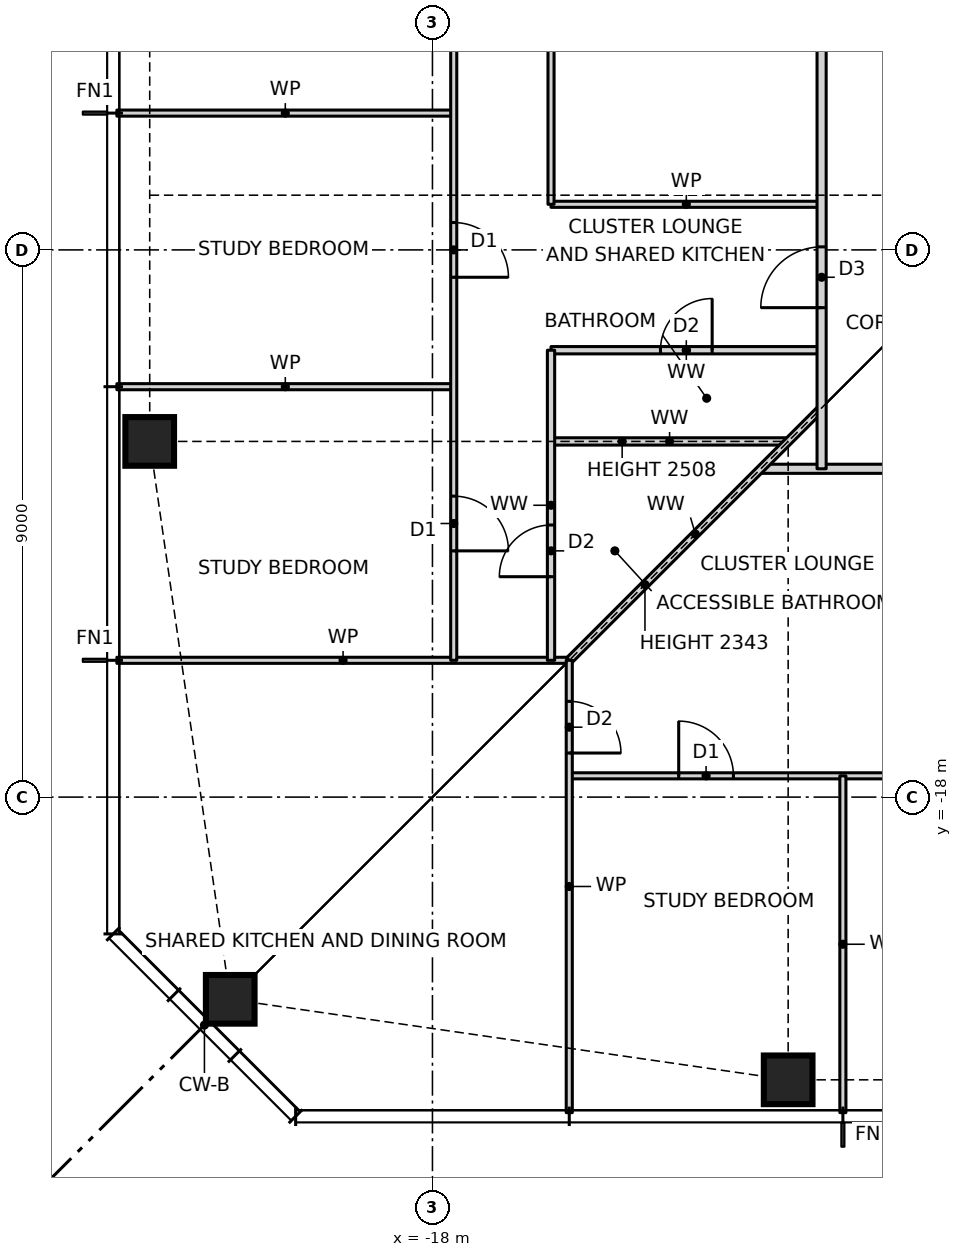
"""IFC4 building model, lengths in metres.
Left out: names, types, materials, properties, quantities, classifications, styles, units other than length and angle.
Written with IfcOpenShell. Run it as: python <this file> out.ifc"""

import sys

from ifc_helpers import new_model, si_unit, direction, frame, frame_2d, origin, origin_2d, place, context, subcontext, project, spatial, rectangle, hollow_rectangle, extrude, element, fill, save


model = new_model("IFC4")
c1 = context("Model", 3, precision=1e-05, world=origin(), true_north=direction((0.0, 1.0)))
c2 = subcontext(c1, "Body", "Model", "MODEL_VIEW")
j1 = project(units=[si_unit("LENGTHUNIT", "METRE"), si_unit("PLANEANGLEUNIT", "RADIAN")], contexts=[c1])
p1 = place(None, origin())
s1 = spatial("IfcSite", under=j1, at=p1, CompositionType="ELEMENT")
p2 = place(p1, origin())
s2 = spatial("IfcBuilding", under=s1, at=p2, CompositionType="ELEMENT")
p3 = place(p2, frame((0.0, 0.0, 22.0)))
s3 = spatial("IfcBuildingStorey", under=s2, at=p3, CompositionType="ELEMENT", Elevation=22.0)
for number, where, z_axis, x_axis in (
    (1, (-21.326, -21.326, 0.0), (0.0, 0.0, 1.0), (1.0, 0.0, 0.0)),
    (2, (-12.15, -22.65, 0.0), (0.0, 0.0, 1.0), (1.0, 0.0, 0.0)),
    (3, (-22.65, -12.15, 0.0), (0.0, 0.0, 1.0), (1.0, 0.0, 0.0)),
):
    element("IfcColumn", number, at=place(p3, frame(where, z_axis=z_axis, x_axis=x_axis)), inside=s3, PredefinedType="COLUMN", context=c2, shape_type="SweptSolid", body=[
        extrude(hollow_rectangle(XDim=0.8, YDim=0.8, WallThickness=0.09, at=origin_2d()), origin(), (0.0, 0.0, 1.0), 3.5),
    ])
p4 = place(p3, frame((-15.75, -17.65, 0.0), z_axis=(0.0, 0.0, 1.0), x_axis=(1.0, 0.0, 0.0)))
e4 = element("IfcWall", 4, at=p4, inside=s3, PredefinedType="PARTITIONING", context=c2, shape_type="SweptSolid", body=[
    extrude(rectangle(XDim=31.5, YDim=0.1, at=frame_2d((15.75, 0.0))), origin(), (0.0, 0.0, 1.0), 3.27),
])
p5 = place(p4, frame((1.8, 0.0, 0.0)))
e5 = element("IfcOpeningElement", 5, at=p5, cuts=e4, PredefinedType="OPENING", context=c2, shape_type="SweptSolid", body=[
    extrude(rectangle(XDim=0.9, YDim=2.1, at=frame_2d((0.45, 1.05))), frame((0.0, 0.06, 0.0), z_axis=(0.0, -1.0, 0.0), x_axis=(1.0, 0.0, 0.0)), (0.0, 0.0, 1.0), 0.12),
])
p6 = place(p4, frame((6.3, 0.0, 0.0)))
e6 = element("IfcOpeningElement", 6, at=p6, cuts=e4, PredefinedType="OPENING", context=c2, shape_type="SweptSolid", body=[
    extrude(rectangle(XDim=0.9, YDim=2.1, at=frame_2d((0.45, 1.05))), frame((0.0, 0.06, 0.0), z_axis=(0.0, -1.0, 0.0), x_axis=(1.0, 0.0, 0.0)), (0.0, 0.0, 1.0), 0.12),
])
p7 = place(p4, frame((10.8, 0.0, 0.0)))
e7 = element("IfcOpeningElement", 7, at=p7, cuts=e4, PredefinedType="OPENING", context=c2, shape_type="SweptSolid", body=[
    extrude(rectangle(XDim=0.9, YDim=2.1, at=frame_2d((0.45, 1.05))), frame((0.0, 0.06, 0.0), z_axis=(0.0, -1.0, 0.0), x_axis=(1.0, 0.0, 0.0)), (0.0, 0.0, 1.0), 0.12),
])
p8 = place(p4, frame((15.3, 0.0, 0.0)))
e8 = element("IfcOpeningElement", 8, at=p8, cuts=e4, PredefinedType="OPENING", context=c2, shape_type="SweptSolid", body=[
    extrude(rectangle(XDim=0.9, YDim=2.1, at=frame_2d((0.45, 1.05))), frame((0.0, 0.06, 0.0), z_axis=(0.0, -1.0, 0.0), x_axis=(1.0, 0.0, 0.0)), (0.0, 0.0, 1.0), 0.12),
])
p9 = place(p4, frame((19.8, 0.0, 0.0)))
e9 = element("IfcOpeningElement", 9, at=p9, cuts=e4, PredefinedType="OPENING", context=c2, shape_type="SweptSolid", body=[
    extrude(rectangle(XDim=0.9, YDim=2.1, at=frame_2d((0.45, 1.05))), frame((0.0, 0.06, 0.0), z_axis=(0.0, -1.0, 0.0), x_axis=(1.0, 0.0, 0.0)), (0.0, 0.0, 1.0), 0.12),
])
p10 = place(p4, frame((24.3, 0.0, 0.0)))
e10 = element("IfcOpeningElement", 10, at=p10, cuts=e4, PredefinedType="OPENING", context=c2, shape_type="SweptSolid", body=[
    extrude(rectangle(XDim=0.9, YDim=2.1, at=frame_2d((0.45, 1.05))), frame((0.0, 0.06, 0.0), z_axis=(0.0, -1.0, 0.0), x_axis=(1.0, 0.0, 0.0)), (0.0, 0.0, 1.0), 0.12),
])
p11 = place(p4, frame((28.8, 0.0, 0.0)))
e11 = element("IfcOpeningElement", 11, at=p11, cuts=e4, PredefinedType="OPENING", context=c2, shape_type="SweptSolid", body=[
    extrude(rectangle(XDim=0.9, YDim=2.1, at=frame_2d((0.45, 1.05))), frame((0.0, 0.06, 0.0), z_axis=(0.0, -1.0, 0.0), x_axis=(1.0, 0.0, 0.0)), (0.0, 0.0, 1.0), 0.12),
])
p12 = place(p3, frame((-23.19, -15.75, 0.0), z_axis=(0.0, 0.0, 1.0), x_axis=(1.0, 0.0, 0.0)))
e12 = element("IfcWall", 12, at=p12, inside=s3, PredefinedType="PARTITIONING", context=c2, shape_type="SweptSolid", body=[
    extrude(rectangle(XDim=7.44, YDim=0.1, at=frame_2d((3.72, 0.0))), origin(), (0.0, 0.0, 1.0), 3.27),
])
p13 = place(p3, frame((-12.6, -12.6, 0.0), z_axis=(0.0, 0.0, 1.0), x_axis=(1.0, 0.0, 0.0)))
e13 = element("IfcWall", 13, at=p13, inside=s3, PredefinedType="PARTITIONING", context=c2, shape_type="SweptSolid", body=[
    extrude(rectangle(XDim=25.2, YDim=0.15, at=frame_2d((12.6, 0.0))), origin(), (0.0, 0.0, 1.0), 3.27),
])
p14 = place(p13, frame((21.05, 0.0, 0.0)))
e14 = element("IfcOpeningElement", 14, at=p14, cuts=e13, PredefinedType="OPENING", context=c2, shape_type="SweptSolid", body=[
    extrude(rectangle(XDim=1.0, YDim=2.1, at=frame_2d((0.5, 1.05))), frame((0.0, 0.085, 0.0), z_axis=(0.0, -1.0, 0.0), x_axis=(1.0, 0.0, 0.0)), (0.0, 0.0, 1.0), 0.17),
])
p15 = place(p3, frame((-16.05, -12.15, 0.0), z_axis=(0.0, 0.0, 1.0), x_axis=(1.0, 0.0, 0.0)))
e15 = element("IfcWall", 15, at=p15, inside=s3, PredefinedType="PARTITIONING", context=c2, shape_type="SweptSolid", body=[
    extrude(rectangle(XDim=3.9, YDim=0.12, at=frame_2d((1.95, 0.0))), origin(), (0.0, 0.0, 1.0), 2.508),
])
p16 = place(p3, frame((-23.19, -11.25, 0.0), z_axis=(0.0, 0.0, 1.0), x_axis=(1.0, 0.0, 0.0)))
e16 = element("IfcWall", 16, at=p16, inside=s3, PredefinedType="PARTITIONING", context=c2, shape_type="SweptSolid", body=[
    extrude(rectangle(XDim=5.54, YDim=0.1, at=frame_2d((2.77, 0.0))), origin(), (0.0, 0.0, 1.0), 3.27),
])
p17 = place(p3, frame((-16.05, -10.65, 0.0), z_axis=(0.0, 0.0, 1.0), x_axis=(1.0, 0.0, 0.0)))
e17 = element("IfcWall", 17, at=p17, inside=s3, PredefinedType="PARTITIONING", context=c2, shape_type="SweptSolid", body=[
    extrude(rectangle(XDim=4.45, YDim=0.12, at=frame_2d((2.225, 0.0))), origin(), (0.0, 0.0, 1.0), 3.27),
])
p18 = place(p17, frame((1.8, 0.0, 0.0)))
e18 = element("IfcOpeningElement", 18, at=p18, cuts=e17, PredefinedType="OPENING", context=c2, shape_type="SweptSolid", body=[
    extrude(rectangle(XDim=0.85, YDim=2.1, at=frame_2d((0.425, 1.05))), frame((0.0, 0.07, 0.0), z_axis=(0.0, -1.0, 0.0), x_axis=(1.0, 0.0, 0.0)), (0.0, 0.0, 1.0), 0.14),
])
p19 = place(p3, frame((-16.05, -8.25, 0.0), z_axis=(0.0, 0.0, 1.0), x_axis=(1.0, 0.0, 0.0)))
e19 = element("IfcWall", 19, at=p19, inside=s3, PredefinedType="PARTITIONING", context=c2, shape_type="SweptSolid", body=[
    extrude(rectangle(XDim=4.45, YDim=0.1, at=frame_2d((2.225, 0.0))), origin(), (0.0, 0.0, 1.0), 3.27),
])
p20 = place(p3, frame((-23.19, -6.75, 0.0), z_axis=(0.0, 0.0, 1.0), x_axis=(1.0, 0.0, 0.0)))
e20 = element("IfcWall", 20, at=p20, inside=s3, PredefinedType="PARTITIONING", context=c2, shape_type="SweptSolid", body=[
    extrude(rectangle(XDim=5.54, YDim=0.1, at=frame_2d((2.77, 0.0))), origin(), (0.0, 0.0, 1.0), 3.27),
])
p21 = place(p3, frame((-15.75, -15.75, 0.0), z_axis=(0.0, 0.0, 1.0), x_axis=(0.707106781187, 0.707106781187, 0.0)))
e21 = element("IfcWall", 21, at=p21, inside=s3, PredefinedType="PARTITIONING", context=c2, shape_type="SweptSolid", body=[
    extrude(rectangle(XDim=5.869, YDim=0.12, at=frame_2d((2.935, 0.0))), origin(), (0.0, 0.0, 1.0), 2.343),
])
p22 = place(p3, frame((-11.25, -23.19, 0.0), z_axis=(0.0, 0.0, 1.0), x_axis=(0.0, 1.0, 0.0)))
e22 = element("IfcWall", 22, at=p22, inside=s3, PredefinedType="PARTITIONING", context=c2, shape_type="SweptSolid", body=[
    extrude(rectangle(XDim=5.54, YDim=0.1, at=frame_2d((2.77, 0.0))), origin(), (0.0, 0.0, 1.0), 3.27),
])
p23 = place(p3, frame((-11.6, -12.6, 0.0), z_axis=(0.0, 0.0, 1.0), x_axis=(0.0, 1.0, 0.0)))
e23 = element("IfcWall", 23, at=p23, inside=s3, PredefinedType="PARTITIONING", context=c2, shape_type="SweptSolid", body=[
    extrude(rectangle(XDim=24.2, YDim=0.15, at=frame_2d((12.1, 0.0))), origin(), (0.0, 0.0, 1.0), 3.27),
])
p24 = place(p23, frame((2.65, 0.0, 0.0)))
e24 = element("IfcOpeningElement", 24, at=p24, cuts=e23, PredefinedType="OPENING", context=c2, shape_type="SweptSolid", body=[
    extrude(rectangle(XDim=1.0, YDim=2.1, at=frame_2d((0.5, 1.05))), frame((0.0, 0.085, 0.0), z_axis=(0.0, -1.0, 0.0), x_axis=(1.0, 0.0, 0.0)), (0.0, 0.0, 1.0), 0.17),
])
p25 = place(p3, frame((-15.75, -23.19, 0.0), z_axis=(0.0, 0.0, 1.0), x_axis=(0.0, 1.0, 0.0)))
e25 = element("IfcWall", 25, at=p25, inside=s3, PredefinedType="PARTITIONING", context=c2, shape_type="SweptSolid", body=[
    extrude(rectangle(XDim=7.44, YDim=0.1, at=frame_2d((3.72, 0.0))), origin(), (0.0, 0.0, 1.0), 3.27),
])
p26 = place(p25, frame((5.915, 0.0, 0.0)))
e26 = element("IfcOpeningElement", 26, at=p26, cuts=e25, PredefinedType="OPENING", context=c2, shape_type="SweptSolid", body=[
    extrude(rectangle(XDim=0.85, YDim=2.1, at=frame_2d((0.425, 1.05))), frame((0.0, 0.06, 0.0), z_axis=(0.0, -1.0, 0.0), x_axis=(1.0, 0.0, 0.0)), (0.0, 0.0, 1.0), 0.12),
])
p27 = place(p3, frame((-16.05, -15.75, 0.0), z_axis=(0.0, 0.0, 1.0), x_axis=(0.0, 1.0, 0.0)))
e27 = element("IfcWall", 27, at=p27, inside=s3, PredefinedType="PARTITIONING", context=c2, shape_type="SweptSolid", body=[
    extrude(rectangle(XDim=5.1, YDim=0.12, at=frame_2d((2.55, 0.0))), origin(), (0.0, 0.0, 1.0), 3.27),
])
p28 = place(p27, frame((1.375, 0.0, 0.0)))
e28 = element("IfcOpeningElement", 28, at=p28, cuts=e27, PredefinedType="OPENING", context=c2, shape_type="SweptSolid", body=[
    extrude(rectangle(XDim=0.85, YDim=2.1, at=frame_2d((0.425, 1.05))), frame((0.0, 0.07, 0.0), z_axis=(0.0, -1.0, 0.0), x_axis=(1.0, 0.0, 0.0)), (0.0, 0.0, 1.0), 0.14),
])
p29 = place(p3, frame((-16.05, -8.25, 0.0), z_axis=(0.0, 0.0, 1.0), x_axis=(0.0, 1.0, 0.0)))
e29 = element("IfcWall", 29, at=p29, inside=s3, PredefinedType="PARTITIONING", context=c2, shape_type="SweptSolid", body=[
    extrude(rectangle(XDim=20.2, YDim=0.1, at=frame_2d((10.1, 0.0))), origin(), (0.0, 0.0, 1.0), 3.27),
])
p30 = place(p29, frame((9.675, 0.0, 0.0)))
e30 = element("IfcOpeningElement", 30, at=p30, cuts=e29, PredefinedType="OPENING", context=c2, shape_type="SweptSolid", body=[
    extrude(rectangle(XDim=0.85, YDim=2.1, at=frame_2d((0.425, 1.05))), frame((0.0, 0.06, 0.0), z_axis=(0.0, -1.0, 0.0), x_axis=(1.0, 0.0, 0.0)), (0.0, 0.0, 1.0), 0.12),
])
p31 = place(p3, frame((-17.65, -15.75, 0.0), z_axis=(0.0, 0.0, 1.0), x_axis=(0.0, 1.0, 0.0)))
e31 = element("IfcWall", 31, at=p31, inside=s3, PredefinedType="PARTITIONING", context=c2, shape_type="SweptSolid", body=[
    extrude(rectangle(XDim=31.5, YDim=0.1, at=frame_2d((15.75, 0.0))), origin(), (0.0, 0.0, 1.0), 3.27),
])
p32 = place(p31, frame((28.8, 0.0, 0.0)))
e32 = element("IfcOpeningElement", 32, at=p32, cuts=e31, PredefinedType="OPENING", context=c2, shape_type="SweptSolid", body=[
    extrude(rectangle(XDim=0.9, YDim=2.1, at=frame_2d((0.45, 1.05))), frame((0.0, 0.06, 0.0), z_axis=(0.0, -1.0, 0.0), x_axis=(1.0, 0.0, 0.0)), (0.0, 0.0, 1.0), 0.12),
])
p33 = place(p31, frame((24.3, 0.0, 0.0)))
e33 = element("IfcOpeningElement", 33, at=p33, cuts=e31, PredefinedType="OPENING", context=c2, shape_type="SweptSolid", body=[
    extrude(rectangle(XDim=0.9, YDim=2.1, at=frame_2d((0.45, 1.05))), frame((0.0, 0.06, 0.0), z_axis=(0.0, -1.0, 0.0), x_axis=(1.0, 0.0, 0.0)), (0.0, 0.0, 1.0), 0.12),
])
p34 = place(p31, frame((19.8, 0.0, 0.0)))
e34 = element("IfcOpeningElement", 34, at=p34, cuts=e31, PredefinedType="OPENING", context=c2, shape_type="SweptSolid", body=[
    extrude(rectangle(XDim=0.9, YDim=2.1, at=frame_2d((0.45, 1.05))), frame((0.0, 0.06, 0.0), z_axis=(0.0, -1.0, 0.0), x_axis=(1.0, 0.0, 0.0)), (0.0, 0.0, 1.0), 0.12),
])
p35 = place(p31, frame((15.3, 0.0, 0.0)))
e35 = element("IfcOpeningElement", 35, at=p35, cuts=e31, PredefinedType="OPENING", context=c2, shape_type="SweptSolid", body=[
    extrude(rectangle(XDim=0.9, YDim=2.1, at=frame_2d((0.45, 1.05))), frame((0.0, 0.06, 0.0), z_axis=(0.0, -1.0, 0.0), x_axis=(1.0, 0.0, 0.0)), (0.0, 0.0, 1.0), 0.12),
])
p36 = place(p31, frame((10.8, 0.0, 0.0)))
e36 = element("IfcOpeningElement", 36, at=p36, cuts=e31, PredefinedType="OPENING", context=c2, shape_type="SweptSolid", body=[
    extrude(rectangle(XDim=0.9, YDim=2.1, at=frame_2d((0.45, 1.05))), frame((0.0, 0.06, 0.0), z_axis=(0.0, -1.0, 0.0), x_axis=(1.0, 0.0, 0.0)), (0.0, 0.0, 1.0), 0.12),
])
p37 = place(p31, frame((6.3, 0.0, 0.0)))
e37 = element("IfcOpeningElement", 37, at=p37, cuts=e31, PredefinedType="OPENING", context=c2, shape_type="SweptSolid", body=[
    extrude(rectangle(XDim=0.9, YDim=2.1, at=frame_2d((0.45, 1.05))), frame((0.0, 0.06, 0.0), z_axis=(0.0, -1.0, 0.0), x_axis=(1.0, 0.0, 0.0)), (0.0, 0.0, 1.0), 0.12),
])
p38 = place(p31, frame((1.8, 0.0, 0.0)))
e38 = element("IfcOpeningElement", 38, at=p38, cuts=e31, PredefinedType="OPENING", context=c2, shape_type="SweptSolid", body=[
    extrude(rectangle(XDim=0.9, YDim=2.1, at=frame_2d((0.45, 1.05))), frame((0.0, 0.06, 0.0), z_axis=(0.0, -1.0, 0.0), x_axis=(1.0, 0.0, 0.0)), (0.0, 0.0, 1.0), 0.12),
])
p39 = place(p5, origin())
e39 = element("IfcDoor", 39, at=p39, inside=s3, OperationType="SINGLE_SWING_LEFT", PredefinedType="DOOR", context=c2, shape_type="SweptSolid", body=[
    extrude(rectangle(XDim=0.9, YDim=2.1, at=frame_2d((0.45, 1.05))), frame((0.0, 0.025, 0.0), z_axis=(0.0, -1.0, 0.0), x_axis=(1.0, 0.0, 0.0)), (0.0, 0.0, 1.0), 0.05),
])
fill(e5, e39)
p40 = place(p37, frame((0.9, 0.0, 0.0), z_axis=(0.0, 0.0, 1.0), x_axis=(-1.0, 0.0, 0.0)))
e40 = element("IfcDoor", 40, at=p40, inside=s3, OperationType="SINGLE_SWING_RIGHT", PredefinedType="DOOR", context=c2, shape_type="SweptSolid", body=[
    extrude(rectangle(XDim=0.9, YDim=2.1, at=frame_2d((0.45, 1.05))), frame((0.0, 0.025, 0.0), z_axis=(0.0, -1.0, 0.0), x_axis=(1.0, 0.0, 0.0)), (0.0, 0.0, 1.0), 0.05),
])
fill(e37, e40)
p41 = place(p38, frame((0.9, 0.0, 0.0), z_axis=(0.0, 0.0, 1.0), x_axis=(-1.0, 0.0, 0.0)))
e41 = element("IfcDoor", 41, at=p41, inside=s3, OperationType="SINGLE_SWING_RIGHT", PredefinedType="DOOR", context=c2, shape_type="SweptSolid", body=[
    extrude(rectangle(XDim=0.9, YDim=2.1, at=frame_2d((0.45, 1.05))), frame((0.0, 0.025, 0.0), z_axis=(0.0, -1.0, 0.0), x_axis=(1.0, 0.0, 0.0)), (0.0, 0.0, 1.0), 0.05),
])
fill(e38, e41)
p42 = place(p24, origin())
e42 = element("IfcDoor", 42, at=p42, inside=s3, OperationType="SINGLE_SWING_LEFT", PredefinedType="DOOR", context=c2, shape_type="SweptSolid", body=[
    extrude(rectangle(XDim=1.0, YDim=2.1, at=frame_2d((0.5, 1.05))), frame((0.0, 0.025, 0.0), z_axis=(0.0, -1.0, 0.0), x_axis=(1.0, 0.0, 0.0)), (0.0, 0.0, 1.0), 0.05),
])
fill(e24, e42)
p43 = place(p18, origin())
e43 = element("IfcDoor", 43, at=p43, inside=s3, OperationType="SINGLE_SWING_RIGHT", PredefinedType="DOOR", context=c2, shape_type="SweptSolid", body=[
    extrude(rectangle(XDim=0.85, YDim=2.1, at=frame_2d((0.425, 1.05))), frame((0.0, 0.025, 0.0), z_axis=(0.0, -1.0, 0.0), x_axis=(1.0, 0.0, 0.0)), (0.0, 0.0, 1.0), 0.05),
])
fill(e18, e43)
p44 = place(p28, origin())
e44 = element("IfcDoor", 44, at=p44, inside=s3, OperationType="SINGLE_SWING_LEFT", PredefinedType="DOOR", context=c2, shape_type="SweptSolid", body=[
    extrude(rectangle(XDim=0.85, YDim=2.1, at=frame_2d((0.425, 1.05))), frame((0.0, 0.025, 0.0), z_axis=(0.0, -1.0, 0.0), x_axis=(1.0, 0.0, 0.0)), (0.0, 0.0, 1.0), 0.05),
])
fill(e28, e44)
p45 = place(p26, frame((0.85, 0.0, 0.0), z_axis=(0.0, 0.0, 1.0), x_axis=(-1.0, 0.0, 0.0)))
e45 = element("IfcDoor", 45, at=p45, inside=s3, OperationType="SINGLE_SWING_RIGHT", PredefinedType="DOOR", context=c2, shape_type="SweptSolid", body=[
    extrude(rectangle(XDim=0.85, YDim=2.1, at=frame_2d((0.425, 1.05))), frame((0.0, 0.025, 0.0), z_axis=(0.0, -1.0, 0.0), x_axis=(1.0, 0.0, 0.0)), (0.0, 0.0, 1.0), 0.05),
])
fill(e26, e45)
save(model, sys.argv[1])
